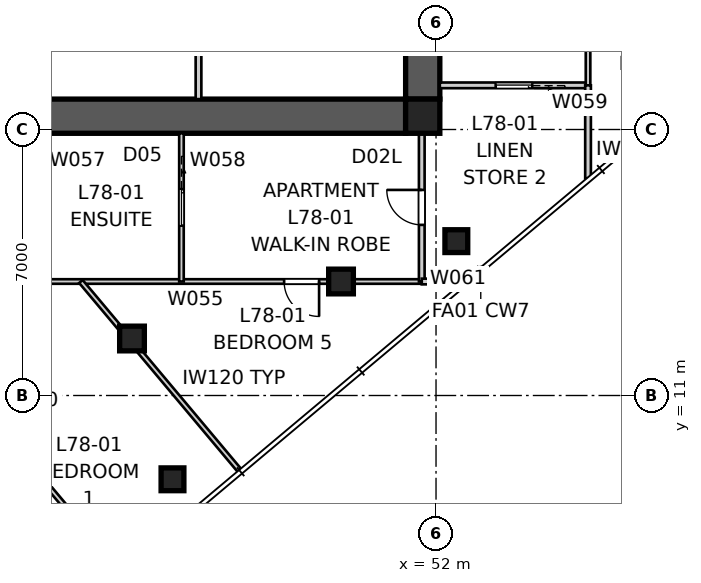
"""IFC4 building model, lengths in metres.
Left out: names, types, materials, properties, quantities, classifications, styles, units other than length and angle.
Written with IfcOpenShell. Run it as: python <this file> out.ifc"""

import sys

from ifc_helpers import new_model, si_unit, direction, frame, frame_2d, origin, origin_2d, place, context, subcontext, project, spatial, polyline, rectangle, outline, extrude, element, fill, save


model = new_model("IFC4")
c1 = context("Model", 3, precision=1e-05, world=origin(), true_north=direction((0.0, 1.0)))
c2 = subcontext(c1, "Body", "Model", "MODEL_VIEW")
j1 = project(units=[si_unit("LENGTHUNIT", "METRE"), si_unit("PLANEANGLEUNIT", "RADIAN")], contexts=[c1])
p1 = place(None, origin())
s1 = spatial("IfcSite", under=j1, at=p1, CompositionType="ELEMENT")
p2 = place(p1, origin())
s2 = spatial("IfcBuilding", under=s1, at=p2, CompositionType="ELEMENT")
p3 = place(p2, frame((0.0, 0.0, 282.8)))
s3 = spatial("IfcBuildingStorey", under=s2, at=p3, CompositionType="ELEMENT", Elevation=282.8)
p4 = place(p3, frame((51.2, 18.35, 0.0), z_axis=(0.0, 0.0, 1.0), x_axis=(-1.0, 0.0, 0.0)))
e1 = element("IfcWall", 1, at=p4, inside=s3, PredefinedType="SHEAR", context=c2, shape_type="SweptSolid", body=[
    extrude(outline(polyline([(0.0, -0.45), (22.4, -0.45), (22.4, -0.025), (22.85, -0.025), (22.85, 0.025), (22.4, 0.025), (22.4, 0.45), (0.0, 0.45), (0.0, 0.025), (-0.45, 0.025), (-0.45, -0.025), (0.0, -0.025), (0.0, -0.45)])), origin(), (0.0, 0.0, 1.0), 3.4),
])
p5 = place(p3, frame((51.65, 18.8, 0.0), z_axis=(0.0, 0.0, 1.0), x_axis=(0.0, 1.0, 0.0)))
e2 = element("IfcWall", 2, at=p5, inside=s3, PredefinedType="SHEAR", context=c2, shape_type="SweptSolid", body=[
    extrude(outline(polyline([(0.0, -0.45), (22.4, -0.45), (22.4, -0.025), (22.85, -0.025), (22.85, 0.025), (22.4, 0.025), (22.4, 0.45), (0.0, 0.45), (0.0, 0.025), (-0.45, 0.025), (-0.45, -0.025), (0.0, -0.025), (0.0, -0.45)])), origin(), (0.0, 0.0, 1.0), 3.4),
])
p6 = place(p5, frame((11.14, 0.0, 0.0)))
e3 = element("IfcOpeningElement", 3, at=p6, cuts=e2, PredefinedType="OPENING", context=c2, shape_type="SweptSolid", body=[
    extrude(rectangle(XDim=1.02, YDim=2.4, at=frame_2d((0.51, 1.2))), frame((0.0, 0.46, 0.0), z_axis=(0.0, -1.0, 0.0), x_axis=(1.0, 0.0, 0.0)), (0.0, 0.0, 1.0), 0.92),
])
p7 = place(p3, frame((51.65, 18.35, 0.0), z_axis=(0.0, 0.0, 1.0), x_axis=(1.0, 0.0, 0.0)))
e4 = element("IfcColumn", 4, at=p7, inside=s3, PredefinedType="COLUMN", context=c2, shape_type="SweptSolid", body=[
    extrude(rectangle(XDim=0.9, YDim=0.9, at=origin_2d()), origin(), (0.0, 0.0, 1.0), 3.4),
])
for number, where, z_axis, x_axis in (
    (5, (45.065, 8.795, 0.0), (0.0, 0.0, 1.0), (1.0, 0.0, 0.0)),
    (6, (52.534, 15.062, 0.0), (0.0, 0.0, 1.0), (1.0, 0.0, 0.0)),
):
    element("IfcColumn", number, at=place(p3, frame(where, z_axis=z_axis, x_axis=x_axis)), inside=s3, PredefinedType="COLUMN", context=c2, shape_type="SweptSolid", body=[
        extrude(rectangle(XDim=0.6, YDim=0.6, at=origin_2d()), origin(), (0.0, 0.0, 1.0), 3.4),
    ])
for number, where, z_axis, x_axis in (
    (7, (44.0, 12.5, 0.0), (0.0, 0.0, 1.0), (1.0, 0.0, 0.0)),
    (8, (49.5, 14.0, 0.0), (0.0, 0.0, 1.0), (1.0, 0.0, 0.0)),
):
    element("IfcColumn", number, at=place(p3, frame(where, z_axis=z_axis, x_axis=x_axis)), inside=s3, PredefinedType="COLUMN", context=c2, shape_type="SweptSolid", body=[
        extrude(rectangle(XDim=0.65, YDim=0.65, at=origin_2d()), origin(), (0.0, 0.0, 1.0), 3.4),
    ])
p8 = place(p3, frame((45.75, 18.8, 0.0), z_axis=(0.0, 0.0, 1.0), x_axis=(0.0, 1.0, 0.0)))
e9 = element("IfcWall", 9, at=p8, inside=s3, PredefinedType="SOLIDWALL", context=c2, shape_type="SweptSolid", body=[
    extrude(rectangle(XDim=5.95, YDim=0.15, at=frame_2d((2.975, 0.0))), origin(), (0.0, 0.0, 1.0), 3.25),
])
p9 = place(p8, frame((2.515, 0.0, 0.0)))
e10 = element("IfcOpeningElement", 10, at=p9, cuts=e9, PredefinedType="OPENING", context=c2, shape_type="SweptSolid", body=[
    extrude(rectangle(XDim=0.92, YDim=2.1, at=frame_2d((0.46, 1.05))), frame((0.0, 0.085, 0.0), z_axis=(0.0, -1.0, 0.0), x_axis=(1.0, 0.0, 0.0)), (0.0, 0.0, 1.0), 0.17),
])
p10 = place(p3, frame((51.625, 14.0, 0.0), z_axis=(0.0, 0.0, 1.0), x_axis=(-1.0, 0.0, 0.0)))
e11 = element("IfcWall", 11, at=p10, inside=s3, PredefinedType="PARTITIONING", context=c2, shape_type="SweptSolid", body=[
    extrude(rectangle(XDim=17.067, YDim=0.12, at=frame_2d((8.533, 0.0))), origin(), (0.0, 0.0, 1.0), 2.549),
])
p11 = place(p10, frame((2.702, 0.0, 0.0)))
e12 = element("IfcOpeningElement", 12, at=p11, cuts=e11, PredefinedType="OPENING", context=c2, shape_type="SweptSolid", body=[
    extrude(rectangle(XDim=0.92, YDim=2.34, at=frame_2d((0.46, 1.17))), frame((0.0, 0.07, 0.0), z_axis=(0.0, -1.0, 0.0), x_axis=(1.0, 0.0, 0.0)), (0.0, 0.0, 1.0), 0.14),
])
p12 = place(p10, frame((11.4, 0.0, 0.0)))
e13 = element("IfcOpeningElement", 13, at=p12, cuts=e11, PredefinedType="OPENING", context=c2, shape_type="SweptSolid", body=[
    extrude(rectangle(XDim=0.92, YDim=2.34, at=frame_2d((0.46, 1.17))), frame((0.0, 0.07, 0.0), z_axis=(0.0, -1.0, 0.0), x_axis=(1.0, 0.0, 0.0)), (0.0, 0.0, 1.0), 0.14),
])
p13 = place(p10, frame((14.544, 0.0, 0.0)))
e14 = element("IfcOpeningElement", 14, at=p13, cuts=e11, PredefinedType="OPENING", context=c2, shape_type="SweptSolid", body=[
    extrude(rectangle(XDim=0.96, YDim=2.1, at=frame_2d((0.48, 1.05))), frame((0.0, 0.07, 0.0), z_axis=(0.0, -1.0, 0.0), x_axis=(1.0, 0.0, 0.0)), (0.0, 0.0, 1.0), 0.14),
])
p14 = place(p3, frame((45.301, 17.9, 0.0), z_axis=(0.0, 0.0, 1.0), x_axis=(0.0, -1.0, 0.0)))
e15 = element("IfcWall", 15, at=p14, inside=s3, PredefinedType="PARTITIONING", context=c2, shape_type="SweptSolid", body=[
    extrude(rectangle(XDim=3.9, YDim=0.12, at=frame_2d((1.95, 0.0))), origin(), (0.0, 0.0, 1.0), 3.25),
])
p15 = place(p14, frame((1.47, 0.0, 0.0)))
e16 = element("IfcOpeningElement", 16, at=p15, cuts=e15, PredefinedType="OPENING", context=c2, shape_type="SweptSolid", body=[
    extrude(rectangle(XDim=0.96, YDim=2.1, at=frame_2d((0.48, 1.05))), frame((0.0, 0.07, 0.0), z_axis=(0.0, -1.0, 0.0), x_axis=(1.0, 0.0, 0.0)), (0.0, 0.0, 1.0), 0.14),
])
p16 = place(p3, frame((56.0, 19.162, 0.0), z_axis=(0.0, 0.0, 1.0), x_axis=(-1.0, 0.0, 0.0)))
e17 = element("IfcWall", 17, at=p16, inside=s3, PredefinedType="SOLIDWALL", context=c2, shape_type="SweptSolid", body=[
    extrude(rectangle(XDim=3.9, YDim=0.15, at=frame_2d((1.95, 0.0))), origin(), (0.0, 0.0, 1.0), 3.25),
])
p17 = place(p16, frame((1.47, 0.0, 0.0)))
e18 = element("IfcOpeningElement", 18, at=p17, cuts=e17, PredefinedType="OPENING", context=c2, shape_type="SweptSolid", body=[
    extrude(rectangle(XDim=0.96, YDim=2.1, at=frame_2d((0.48, 1.05))), frame((0.0, 0.085, 0.0), z_axis=(0.0, -1.0, 0.0), x_axis=(1.0, 0.0, 0.0)), (0.0, 0.0, 1.0), 0.17),
])
p18 = place(p3, frame((56.0, 23.681, 0.0), z_axis=(0.0, 0.0, 1.0), x_axis=(0.0, -1.0, 0.0)))
e19 = element("IfcWall", 19, at=p18, inside=s3, PredefinedType="PARTITIONING", context=c2, shape_type="SweptSolid", body=[
    extrude(rectangle(XDim=4.519, YDim=0.12, at=frame_2d((2.26, 0.0))), origin(), (0.0, 0.0, 1.0), 2.549),
])
p19 = place(p18, frame((1.78, 0.0, 0.0)))
e20 = element("IfcOpeningElement", 20, at=p19, cuts=e19, PredefinedType="OPENING", context=c2, shape_type="SweptSolid", body=[
    extrude(rectangle(XDim=0.96, YDim=2.1, at=frame_2d((0.48, 1.05))), frame((0.0, 0.07, 0.0), z_axis=(0.0, -1.0, 0.0), x_axis=(1.0, 0.0, 0.0)), (0.0, 0.0, 1.0), 0.14),
])
p20 = place(p3, frame((51.625, 14.0, 0.0), z_axis=(0.0, 0.0, 1.0), x_axis=(0.0, 1.0, 0.0)))
e21 = element("IfcWall", 21, at=p20, inside=s3, PredefinedType="SOLIDWALL", context=c2, shape_type="SweptSolid", body=[
    extrude(rectangle(XDim=3.9, YDim=0.15, at=frame_2d((1.95, 0.0))), origin(), (0.0, 0.0, 1.0), 3.25),
])
p21 = place(p20, frame((1.49, 0.0, 0.0)))
e22 = element("IfcOpeningElement", 22, at=p21, cuts=e21, PredefinedType="OPENING", context=c2, shape_type="SweptSolid", body=[
    extrude(rectangle(XDim=0.92, YDim=2.1, at=frame_2d((0.46, 1.05))), frame((0.0, 0.085, 0.0), z_axis=(0.0, -1.0, 0.0), x_axis=(1.0, 0.0, 0.0)), (0.0, 0.0, 1.0), 0.17),
])
p22 = place(p3, frame((52.762, 14.0, 0.0), z_axis=(0.0, 0.0, 1.0), x_axis=(-1.0, 0.0, 0.0)))
e23 = element("IfcWall", 23, at=p22, inside=s3, PredefinedType="SOLIDWALL", context=c2, shape_type="SweptSolid", body=[
    extrude(rectangle(XDim=1.137, YDim=0.15, at=frame_2d((0.569, 0.0))), origin(), (0.0, 0.0, 1.0), 3.25),
])
p23 = place(p3, frame((56.0, 19.162, 0.0), z_axis=(0.0, 0.0, 1.0), x_axis=(0.0, -1.0, 0.0)))
e24 = element("IfcWall", 24, at=p23, inside=s3, PredefinedType="SOLIDWALL", context=c2, shape_type="SweptSolid", body=[
    extrude(rectangle(XDim=2.445, YDim=0.15, at=frame_2d((1.222, 0.0))), origin(), (0.0, 0.0, 1.0), 3.25),
])
p24 = place(p3, frame((34.558, 14.0, 0.0), z_axis=(0.0, 0.0, 1.0), x_axis=(0.642782931909, -0.766048368216, 0.0)))
e25 = element("IfcWall", 25, at=p24, inside=s3, PredefinedType="PARTITIONING", context=c2, shape_type="SweptSolid", body=[
    extrude(rectangle(XDim=11.701, YDim=0.12, at=frame_2d((5.851, 0.0))), origin(), (0.0, 0.0, 1.0), 3.25),
])
p25 = place(p24, frame((5.411, 0.0, 0.0)))
e26 = element("IfcOpeningElement", 26, at=p25, cuts=e25, PredefinedType="OPENING", context=c2, shape_type="SweptSolid", body=[
    extrude(rectangle(XDim=0.92, YDim=2.34, at=frame_2d((0.46, 1.17))), frame((0.0, 0.07, 0.0), z_axis=(0.0, -1.0, 0.0), x_axis=(1.0, 0.0, 0.0)), (0.0, 0.0, 1.0), 0.14),
])
p26 = place(p3, frame((42.656, 14.0, 0.0), z_axis=(0.0, 0.0, 1.0), x_axis=(0.642779498388, -0.766051249233, 0.0)))
e27 = element("IfcWall", 27, at=p26, inside=s3, PredefinedType="PARTITIONING", context=c2, shape_type="SweptSolid", body=[
    extrude(rectangle(XDim=6.496, YDim=0.12, at=frame_2d((3.248, 0.0))), origin(), (0.0, 0.0, 1.0), 3.25),
])
p27 = place(p3, frame((43.672, 6.372, 0.0), z_axis=(0.0, 0.0, 1.0), x_axis=(-0.64278775678, 0.766044319693, 0.0)))
e28 = element("IfcWall", 28, at=p27, inside=s3, PredefinedType="PARTITIONING", context=c2, shape_type="SweptSolid", body=[
    extrude(rectangle(XDim=9.957, YDim=0.12, at=frame_2d((4.979, 0.0))), origin(), (0.0, 0.0, 1.0), 3.25),
])
p28 = place(p3, frame((59.816, 19.919, 0.0), z_axis=(0.0, 0.0, 1.0), x_axis=(-0.642773197476, 0.766056536168, 0.0)))
e29 = element("IfcWall", 29, at=p28, inside=s3, PredefinedType="PARTITIONING", context=c2, shape_type="SweptSolid", body=[
    extrude(rectangle(XDim=5.4, YDim=0.12, at=frame_2d((2.7, 0.0))), origin(), (0.0, 0.0, 1.0), 3.25),
])
p29 = place(p3, frame((51.625, 17.9, 0.0), z_axis=(0.0, 0.0, 1.0), x_axis=(0.027925096799, 0.999610018442, 0.0)))
e30 = element("IfcWall", 30, at=p29, inside=s3, PredefinedType="SOLIDWALL", context=c2, shape_type="SweptSolid", body=[
    extrude(rectangle(XDim=0.9, YDim=0.15, at=frame_2d((0.45, 0.0))), origin(), (0.0, 0.0, 1.0), 3.25),
])
p30 = place(p17, origin())
e31 = element("IfcDoor", 31, at=p30, inside=s3, OperationType="SLIDING_TO_LEFT", PredefinedType="DOOR", context=c2, shape_type="SweptSolid", body=[
    extrude(rectangle(XDim=0.96, YDim=2.1, at=frame_2d((0.48, 1.05))), frame((0.0, 0.025, 0.0), z_axis=(0.0, -1.0, 0.0), x_axis=(1.0, 0.0, 0.0)), (0.0, 0.0, 1.0), 0.05),
])
fill(e18, e31)
p31 = place(p21, origin())
e32 = element("IfcDoor", 32, at=p31, inside=s3, OperationType="SINGLE_SWING_RIGHT", PredefinedType="DOOR", context=c2, shape_type="SweptSolid", body=[
    extrude(rectangle(XDim=0.92, YDim=2.1, at=frame_2d((0.46, 1.05))), frame((0.0, 0.025, 0.0), z_axis=(0.0, -1.0, 0.0), x_axis=(1.0, 0.0, 0.0)), (0.0, 0.0, 1.0), 0.05),
])
fill(e22, e32)
p32 = place(p11, origin())
e33 = element("IfcDoor", 33, at=p32, inside=s3, OperationType="SINGLE_SWING_LEFT", PredefinedType="DOOR", context=c2, shape_type="SweptSolid", body=[
    extrude(rectangle(XDim=0.92, YDim=2.34, at=frame_2d((0.46, 1.17))), frame((0.0, 0.025, 0.0), z_axis=(0.0, -1.0, 0.0), x_axis=(1.0, 0.0, 0.0)), (0.0, 0.0, 1.0), 0.05),
])
fill(e12, e33)
p33 = place(p15, origin())
e34 = element("IfcDoor", 34, at=p33, inside=s3, OperationType="SLIDING_TO_LEFT", PredefinedType="DOOR", context=c2, shape_type="SweptSolid", body=[
    extrude(rectangle(XDim=0.96, YDim=2.1, at=frame_2d((0.48, 1.05))), frame((0.0, 0.025, 0.0), z_axis=(0.0, -1.0, 0.0), x_axis=(1.0, 0.0, 0.0)), (0.0, 0.0, 1.0), 0.05),
])
fill(e16, e34)
save(model, sys.argv[1])
